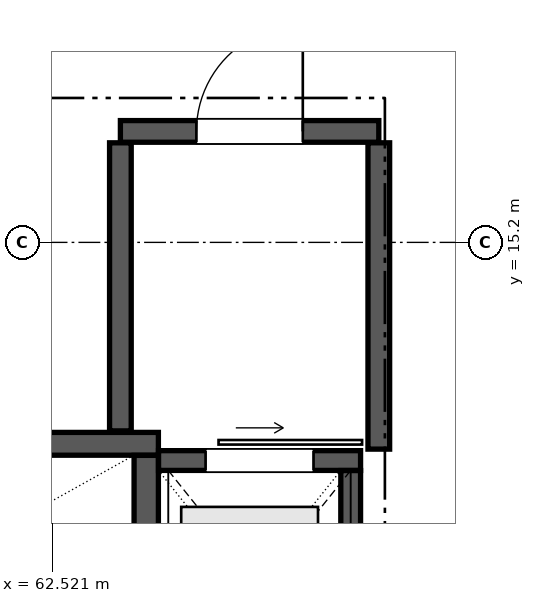
"""IFC4 building model, lengths in metres.
Left out: names, types, materials, properties, quantities, classifications, styles, units other than length and angle.
Written with IfcOpenShell. Run it as: python <this file> out.ifc"""

import sys

from ifc_helpers import new_model, si_unit, direction, frame, frame_2d, origin, place, context, subcontext, project, spatial, rectangle, extrude, element, fill, save


model = new_model("IFC4")
c1 = context("Model", 3, precision=1e-05, world=origin(), true_north=direction((0.0, 1.0)))
c2 = subcontext(c1, "Body", "Model", "MODEL_VIEW")
j1 = project(units=[si_unit("LENGTHUNIT", "METRE"), si_unit("PLANEANGLEUNIT", "RADIAN")], contexts=[c1])
p1 = place(None, origin())
s1 = spatial("IfcSite", under=j1, at=p1, CompositionType="ELEMENT")
p2 = place(p1, origin())
s2 = spatial("IfcBuilding", under=s1, at=p2, CompositionType="ELEMENT")
p3 = place(p2, frame((0.0, 0.0, 17.68)))
s3 = spatial("IfcBuildingStorey", under=s2, at=p3, CompositionType="ELEMENT", Elevation=17.68)
p4 = place(p3, frame((55.5, 12.55, 0.0), z_axis=(0.0, 0.0, 1.0), x_axis=(1.0, 0.0, 0.0)))
e1 = element("IfcWall", 1, at=p4, inside=s3, PredefinedType="SHEAR", context=c2, shape_type="SweptSolid", body=[
    extrude(rectangle(XDim=8.42, YDim=0.3, at=frame_2d((4.21, 0.0))), origin(), (0.0, 0.0, 1.0), 3.775),
])
p5 = place(p4, frame((0.55, 0.0, 0.0)))
e2 = element("IfcOpeningElement", 2, at=p5, cuts=e1, PredefinedType="OPENING", context=c2, shape_type="SweptSolid", body=[
    extrude(rectangle(XDim=1.2, YDim=2.2, at=frame_2d((0.6, 1.1))), frame((0.0, 0.16, 0.0), z_axis=(0.0, -1.0, 0.0), x_axis=(1.0, 0.0, 0.0)), (0.0, 0.0, 1.0), 0.32),
])
p6 = place(p3, frame((63.76, 9.002, 0.0), z_axis=(0.0, 0.0, 1.0), x_axis=(0.0, 1.0, 0.0)))
e3 = element("IfcWall", 3, at=p6, inside=s3, PredefinedType="SHEAR", context=c2, shape_type="SweptSolid", body=[
    extrude(rectangle(XDim=3.396, YDim=0.32, at=frame_2d((1.698, 0.0))), origin(), (0.0, 0.0, 1.0), 3.775),
])
p7 = place(p3, frame((63.922, 12.33, 0.0), z_axis=(0.0, 0.0, 1.0), x_axis=(1.0, 0.0, 0.0)))
e4 = element("IfcWall", 4, at=p7, inside=s3, PredefinedType="SHEAR", context=c2, shape_type="SweptSolid", body=[
    extrude(rectangle(XDim=2.658, YDim=0.26, at=frame_2d((1.329, 0.0))), origin(), (0.0, 0.0, 1.0), 3.775),
])
p8 = place(p7, frame((0.619, 0.0, 0.0)))
e5 = element("IfcOpeningElement", 5, at=p8, cuts=e4, PredefinedType="OPENING", context=c2, shape_type="SweptSolid", body=[
    extrude(rectangle(XDim=1.42, YDim=2.25, at=frame_2d((0.71, 1.125))), frame((0.0, 0.14, 0.0), z_axis=(0.0, -1.0, 0.0), x_axis=(1.0, 0.0, 0.0)), (0.0, 0.0, 1.0), 0.28),
])
p9 = place(p3, frame((66.45, 9.202, 0.0), z_axis=(0.0, 0.0, 1.0), x_axis=(0.0, 1.0, 0.0)))
e6 = element("IfcWall", 6, at=p9, inside=s3, PredefinedType="SHEAR", context=c2, shape_type="SweptSolid", body=[
    extrude(rectangle(XDim=2.996, YDim=0.26, at=frame_2d((1.498, 0.0))), origin(), (0.0, 0.0, 1.0), 3.775),
])
p10 = place(p3, frame((63.42, 16.66, 0.0), z_axis=(0.0, 0.0, 1.0), x_axis=(1.0, 0.0, 0.0)))
e7 = element("IfcWall", 7, at=p10, inside=s3, PredefinedType="SHEAR", context=c2, shape_type="SweptSolid", body=[
    extrude(rectangle(XDim=3.4, YDim=0.285, at=frame_2d((1.7, 0.0))), origin(), (0.0, 0.0, 1.0), 3.775),
])
p11 = place(p10, frame((1.0, 0.0, 0.0)))
e8 = element("IfcOpeningElement", 8, at=p11, cuts=e7, PredefinedType="OPENING", context=c2, shape_type="SweptSolid", body=[
    extrude(rectangle(XDim=1.4, YDim=2.25, at=frame_2d((0.7, 1.125))), frame((0.0, 0.152, 0.0), z_axis=(0.0, -1.0, 0.0), x_axis=(1.0, 0.0, 0.0)), (0.0, 0.0, 1.0), 0.305),
])
p12 = place(p3, frame((63.42, 12.72, 0.0), z_axis=(0.0, 0.0, 1.0), x_axis=(0.0, 1.0, 0.0)))
e9 = element("IfcWall", 9, at=p12, inside=s3, PredefinedType="SHEAR", context=c2, shape_type="SweptSolid", body=[
    extrude(rectangle(XDim=3.79, YDim=0.285, at=frame_2d((1.895, 0.0))), origin(), (0.0, 0.0, 1.0), 3.075),
])
p13 = place(p3, frame((66.82, 12.48, 0.0), z_axis=(0.0, 0.0, 1.0), x_axis=(0.0, 1.0, 0.0)))
e10 = element("IfcWall", 10, at=p13, inside=s3, PredefinedType="SHEAR", context=c2, shape_type="SweptSolid", body=[
    extrude(rectangle(XDim=4.03, YDim=0.285, at=frame_2d((2.015, 0.0))), origin(), (0.0, 0.0, 1.0), 3.075),
])
p14 = place(p8, origin())
e11 = element("IfcDoor", 11, at=p14, inside=s3, OperationType="SLIDING_TO_RIGHT", PredefinedType="DOOR", context=c2, shape_type="SweptSolid", body=[
    extrude(rectangle(XDim=1.42, YDim=2.25, at=frame_2d((0.71, 1.125))), frame((0.0, 0.025, 0.0), z_axis=(0.0, -1.0, 0.0), x_axis=(1.0, 0.0, 0.0)), (0.0, 0.0, 1.0), 0.05),
])
fill(e5, e11)
p15 = place(p11, origin())
e12 = element("IfcDoor", 12, at=p15, inside=s3, OperationType="SINGLE_SWING_RIGHT", PredefinedType="DOOR", context=c2, shape_type="SweptSolid", body=[
    extrude(rectangle(XDim=1.4, YDim=2.25, at=frame_2d((0.7, 1.125))), frame((0.0, 0.025, 0.0), z_axis=(0.0, -1.0, 0.0), x_axis=(1.0, 0.0, 0.0)), (0.0, 0.0, 1.0), 0.05),
])
fill(e8, e12)
save(model, sys.argv[1])
